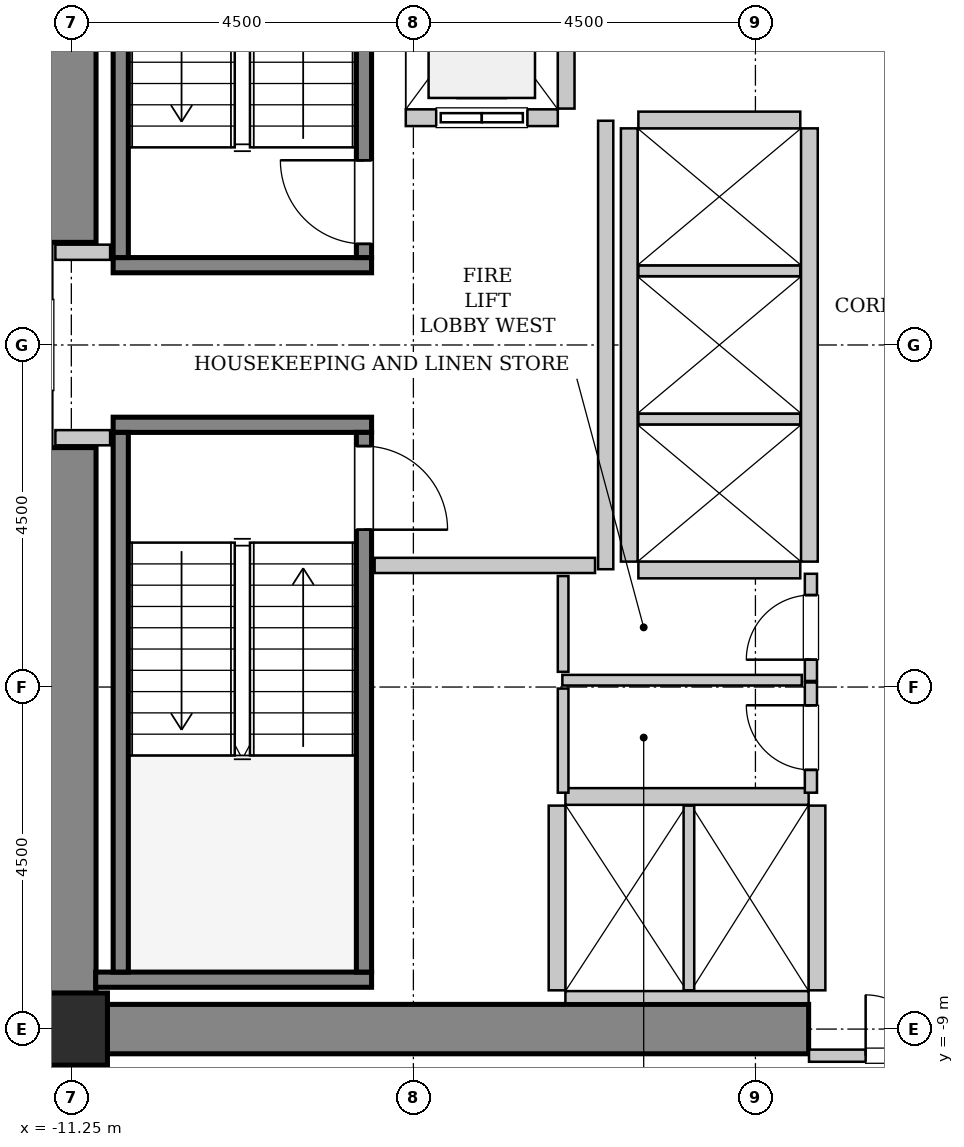
"""IFC4 building model, lengths in metres.
Left out: names, types, materials, properties, quantities, classifications, styles, units other than length and angle.
Written with IfcOpenShell. Run it as: python <this file> out.ifc"""

import sys

from ifc_helpers import new_model, si_unit, direction, frame, frame_2d, origin, origin_2d, place, context, subcontext, project, spatial, rectangle, hollow_rectangle, extrude, source, transform, mapped, element, fill, save


model = new_model("IFC4")
c1 = context("Model", 3, precision=1e-05, world=origin(), true_north=direction((0.0, 1.0)))
c2 = subcontext(c1, "Body", "Model", "MODEL_VIEW")
j1 = project(units=[si_unit("LENGTHUNIT", "METRE"), si_unit("PLANEANGLEUNIT", "RADIAN")], contexts=[c1])
p1 = place(None, origin())
s1 = spatial("IfcSite", under=j1, at=p1, CompositionType="ELEMENT")
p2 = place(p1, origin())
s2 = spatial("IfcBuilding", under=s1, at=p2, CompositionType="ELEMENT")
p3 = place(p2, frame((0.0, 0.0, 55.8)))
s3 = spatial("IfcBuildingStorey", under=s2, at=p3, CompositionType="ELEMENT", Elevation=55.8)
m1 = source(origin(), c2, "Body", "SweptSolid", [
    extrude(rectangle(XDim=10.025, YDim=0.65, at=frame_2d((5.012, 0.0))), origin(), (0.0, 0.0, 1.0), 3.8),
])
p4 = place(p3, frame((-11.575, -9.0, 0.0), z_axis=(0.0, 0.0, 1.0), x_axis=(1.0, 0.0, 0.0)))
e1 = element("IfcWall", 1, at=p4, inside=s3, PredefinedType="SHEAR", context=c2, shape_type="MappedRepresentation", body=[
    mapped(m1, transform((0.0, 0.0, 0.0), x_axis=(1.0, 0.0, 0.0), y_axis=(0.0, 1.0, 0.0), z_axis=(0.0, 0.0, 1.0), scale=1.0)),
])
m2 = source(origin(), c2, "Body", "SweptSolid", [
    extrude(rectangle(XDim=7.325, YDim=0.65, at=frame_2d((3.663, 0.0))), origin(), (0.0, 0.0, 1.0), 3.8),
])
for number, where, z_axis, x_axis in (
    (2, (-11.25, -8.675, 0.0), (0.0, 0.0, 1.0), (0.0, 1.0, 0.0)),
    (3, (-11.25, 1.35, 0.0), (0.0, 0.0, 1.0), (0.0, 1.0, 0.0)),
):
    element("IfcWall", number, at=place(p3, frame(where, z_axis=z_axis, x_axis=x_axis)), inside=s3, PredefinedType="SHEAR", context=c2, shape_type="MappedRepresentation", body=[
        mapped(m2, transform((0.0, 0.0, 0.0), x_axis=(1.0, 0.0, 0.0), y_axis=(0.0, 1.0, 0.0), z_axis=(0.0, 0.0, 1.0), scale=1.0)),
    ])
m3 = source(origin(), c2, "Body", "SweptSolid", [
    extrude(hollow_rectangle(XDim=0.95, YDim=0.95, WallThickness=0.045, InnerFilletRadius=0.045, OuterFilletRadius=0.09, at=origin_2d()), origin(), (0.0, 0.0, 1.0), 3.8),
])
p5 = place(p3, frame((-11.25, -9.0, 0.0), z_axis=(0.0, 0.0, 1.0), x_axis=(1.0, 0.0, 0.0)))
e4 = element("IfcColumn", 4, at=p5, inside=s3, PredefinedType="COLUMN", context=c2, shape_type="MappedRepresentation", body=[
    mapped(m3, transform((0.0, 0.0, 0.0), x_axis=(1.0, 0.0, 0.0), y_axis=(0.0, 1.0, 0.0), z_axis=(0.0, 0.0, 1.0), scale=1.0)),
])
m4 = source(origin(), c2, "Body", "SweptSolid", [
    extrude(rectangle(XDim=3.4, YDim=0.2, at=frame_2d((1.7, 0.0))), origin(), (0.0, 0.0, 1.0), 3.8),
])
p6 = place(p3, frame((-7.3, 1.05, 0.0), z_axis=(0.0, 0.0, 1.0), x_axis=(-1.0, 0.0, 0.0)))
e5 = element("IfcWall", 5, at=p6, inside=s3, PredefinedType="SOLIDWALL", context=c2, shape_type="MappedRepresentation", body=[
    mapped(m4, transform((0.0, 0.0, 0.0), x_axis=(1.0, 0.0, 0.0), y_axis=(0.0, 1.0, 0.0), z_axis=(0.0, 0.0, 1.0), scale=1.0)),
])
m5 = source(origin(), c2, "Body", "SweptSolid", [
    extrude(rectangle(XDim=7.1, YDim=0.2, at=frame_2d((3.55, 0.0))), origin(), (0.0, 0.0, 1.0), 3.8),
])
p7 = place(p3, frame((-7.4, 1.15, 0.0), z_axis=(0.0, 0.0, 1.0), x_axis=(0.0, 1.0, 0.0)))
e6 = element("IfcWall", 6, at=p7, inside=s3, PredefinedType="SOLIDWALL", context=c2, shape_type="MappedRepresentation", body=[
    mapped(m5, transform((0.0, 0.0, 0.0), x_axis=(1.0, 0.0, 0.0), y_axis=(0.0, 1.0, 0.0), z_axis=(0.0, 0.0, 1.0), scale=1.0)),
])
p8 = place(p7, frame((0.18, 0.0, 0.0)))
e7 = element("IfcOpeningElement", 7, at=p8, cuts=e6, PredefinedType="OPENING", context=c2, shape_type="SweptSolid", body=[
    extrude(rectangle(XDim=1.1, YDim=2.15, at=frame_2d((0.55, 1.075))), frame((0.0, 0.11, 0.0), z_axis=(0.0, -1.0, 0.0), x_axis=(1.0, 0.0, 0.0)), (0.0, 0.0, 1.0), 0.22),
])
p9 = place(p3, frame((-10.6, 1.15, 0.0), z_axis=(0.0, 0.0, 1.0), x_axis=(0.0, 1.0, 0.0)))
e8 = element("IfcWall", 8, at=p9, inside=s3, PredefinedType="SOLIDWALL", context=c2, shape_type="MappedRepresentation", body=[
    mapped(m5, transform((0.0, 0.0, 0.0), x_axis=(1.0, 0.0, 0.0), y_axis=(0.0, 1.0, 0.0), z_axis=(0.0, 0.0, 1.0), scale=1.0)),
])
p10 = place(p3, frame((-10.7, -1.05, 0.0), z_axis=(0.0, 0.0, 1.0), x_axis=(1.0, 0.0, 0.0)))
e9 = element("IfcWall", 9, at=p10, inside=s3, PredefinedType="SOLIDWALL", context=c2, shape_type="MappedRepresentation", body=[
    mapped(m4, transform((0.0, 0.0, 0.0), x_axis=(1.0, 0.0, 0.0), y_axis=(0.0, 1.0, 0.0), z_axis=(0.0, 0.0, 1.0), scale=1.0)),
])
m6 = source(origin(), c2, "Body", "SweptSolid", [
    extrude(rectangle(XDim=3.63, YDim=0.2, at=frame_2d((1.815, 0.0))), origin(), (0.0, 0.0, 1.0), 3.8),
])
p11 = place(p3, frame((-10.93, -8.35, 0.0), z_axis=(0.0, 0.0, 1.0), x_axis=(1.0, 0.0, 0.0)))
e10 = element("IfcWall", 10, at=p11, inside=s3, PredefinedType="SOLIDWALL", context=c2, shape_type="MappedRepresentation", body=[
    mapped(m6, transform((0.0, 0.0, 0.0), x_axis=(1.0, 0.0, 0.0), y_axis=(0.0, 1.0, 0.0), z_axis=(0.0, 0.0, 1.0), scale=1.0)),
])
p12 = place(p3, frame((-10.6, -1.15, 0.0), z_axis=(0.0, 0.0, 1.0), x_axis=(0.0, -1.0, 0.0)))
e11 = element("IfcWall", 11, at=p12, inside=s3, PredefinedType="SOLIDWALL", context=c2, shape_type="MappedRepresentation", body=[
    mapped(m5, transform((0.0, 0.0, 0.0), x_axis=(1.0, 0.0, 0.0), y_axis=(0.0, 1.0, 0.0), z_axis=(0.0, 0.0, 1.0), scale=1.0)),
])
p13 = place(p3, frame((-7.4, -1.15, 0.0), z_axis=(0.0, 0.0, 1.0), x_axis=(0.0, -1.0, 0.0)))
e12 = element("IfcWall", 12, at=p13, inside=s3, PredefinedType="SOLIDWALL", context=c2, shape_type="MappedRepresentation", body=[
    mapped(m5, transform((0.0, 0.0, 0.0), x_axis=(1.0, 0.0, 0.0), y_axis=(0.0, 1.0, 0.0), z_axis=(0.0, 0.0, 1.0), scale=1.0)),
])
p14 = place(p13, frame((0.18, 0.0, 0.0)))
e13 = element("IfcOpeningElement", 13, at=p14, cuts=e12, PredefinedType="OPENING", context=c2, shape_type="SweptSolid", body=[
    extrude(rectangle(XDim=1.1, YDim=2.15, at=frame_2d((0.55, 1.075))), frame((0.0, 0.11, 0.0), z_axis=(0.0, -1.0, 0.0), x_axis=(1.0, 0.0, 0.0)), (0.0, 0.0, 1.0), 0.22),
])
m7 = source(origin(), c2, "Body", "SweptSolid", [
    extrude(rectangle(XDim=2.0, YDim=0.22, at=frame_2d((1.0, 0.0))), origin(), (0.0, 0.0, 1.0), 3.535),
])
p15 = place(p3, frame((-6.85, 2.99, 0.0), z_axis=(0.0, 0.0, 1.0), x_axis=(1.0, 0.0, 0.0)))
e14 = element("IfcWall", 14, at=p15, inside=s3, PredefinedType="SOLIDWALL", context=c2, shape_type="MappedRepresentation", body=[
    mapped(m7, transform((0.0, 0.0, 0.0), x_axis=(1.0, 0.0, 0.0), y_axis=(0.0, 1.0, 0.0), z_axis=(0.0, 0.0, 1.0), scale=1.0)),
])
p16 = place(p15, frame((0.4, 0.0, 0.0)))
e15 = element("IfcOpeningElement", 15, at=p16, cuts=e14, PredefinedType="OPENING", context=c2, shape_type="SweptSolid", body=[
    extrude(rectangle(XDim=1.2, YDim=2.2, at=frame_2d((0.6, 1.1))), frame((0.0, 0.12, 0.0), z_axis=(0.0, -1.0, 0.0), x_axis=(1.0, 0.0, 0.0)), (0.0, 0.0, 1.0), 0.24),
])
m8 = source(origin(), c2, "Body", "SweptSolid", [
    extrude(rectangle(XDim=2.68, YDim=0.22, at=frame_2d((1.34, 0.0))), origin(), (0.0, 0.0, 1.0), 3.535),
])
p17 = place(p3, frame((-4.74, 3.11, 0.0), z_axis=(0.0, 0.0, 1.0), x_axis=(0.0, 1.0, 0.0)))
e16 = element("IfcWall", 16, at=p17, inside=s3, PredefinedType="SOLIDWALL", context=c2, shape_type="MappedRepresentation", body=[
    mapped(m8, transform((0.0, 0.0, 0.0), x_axis=(1.0, 0.0, 0.0), y_axis=(0.0, 1.0, 0.0), z_axis=(0.0, 0.0, 1.0), scale=1.0)),
])
m9 = source(origin(), c2, "Body", "SweptSolid", [
    extrude(rectangle(XDim=3.2, YDim=0.22, at=frame_2d((1.6, 0.0))), origin(), (0.0, 0.0, 1.0), 3.535),
])
p18 = place(p3, frame((-1.55, -5.94, 0.0), z_axis=(0.0, 0.0, 1.0), x_axis=(-1.0, 0.0, 0.0)))
e17 = element("IfcWall", 17, at=p18, inside=s3, PredefinedType="SOLIDWALL", context=c2, shape_type="MappedRepresentation", body=[
    mapped(m9, transform((0.0, 0.0, 0.0), x_axis=(1.0, 0.0, 0.0), y_axis=(0.0, 1.0, 0.0), z_axis=(0.0, 0.0, 1.0), scale=1.0)),
])
m10 = source(origin(), c2, "Body", "SweptSolid", [
    extrude(rectangle(XDim=3.2, YDim=0.16, at=frame_2d((1.6, 0.0))), origin(), (0.0, 0.0, 1.0), 2.425),
])
p19 = place(p3, frame((-4.75, -8.58, 0.0), z_axis=(0.0, 0.0, 1.0), x_axis=(1.0, 0.0, 0.0)))
e18 = element("IfcWall", 18, at=p19, inside=s3, PredefinedType="PARTITIONING", context=c2, shape_type="MappedRepresentation", body=[
    mapped(m10, transform((0.0, 0.0, 0.0), x_axis=(1.0, 0.0, 0.0), y_axis=(0.0, 1.0, 0.0), z_axis=(0.0, 0.0, 1.0), scale=1.0)),
])
m11 = source(origin(), c2, "Body", "SweptSolid", [
    extrude(rectangle(XDim=2.43, YDim=0.22, at=frame_2d((1.215, 0.0))), origin(), (0.0, 0.0, 1.0), 3.535),
])
p20 = place(p3, frame((-4.86, -6.06, 0.0), z_axis=(0.0, 0.0, 1.0), x_axis=(0.0, -1.0, 0.0)))
e19 = element("IfcWall", 19, at=p20, inside=s3, PredefinedType="SOLIDWALL", context=c2, shape_type="MappedRepresentation", body=[
    mapped(m11, transform((0.0, 0.0, 0.0), x_axis=(1.0, 0.0, 0.0), y_axis=(0.0, 1.0, 0.0), z_axis=(0.0, 0.0, 1.0), scale=1.0)),
])
m12 = source(origin(), c2, "Body", "SweptSolid", [
    extrude(rectangle(XDim=2.43, YDim=0.14, at=frame_2d((1.215, 0.0))), origin(), (0.0, 0.0, 1.0), 3.535),
])
p21 = place(p3, frame((-3.125, -8.49, 0.0), z_axis=(0.0, 0.0, 1.0), x_axis=(0.0, 1.0, 0.0)))
e20 = element("IfcWall", 20, at=p21, inside=s3, PredefinedType="PARTITIONING", context=c2, shape_type="MappedRepresentation", body=[
    mapped(m12, transform((0.0, 0.0, 0.0), x_axis=(1.0, 0.0, 0.0), y_axis=(0.0, 1.0, 0.0), z_axis=(0.0, 0.0, 1.0), scale=1.0)),
])
p22 = place(p3, frame((-1.44, -8.49, 0.0), z_axis=(0.0, 0.0, 1.0), x_axis=(0.0, 1.0, 0.0)))
e21 = element("IfcWall", 21, at=p22, inside=s3, PredefinedType="SOLIDWALL", context=c2, shape_type="MappedRepresentation", body=[
    mapped(m11, transform((0.0, 0.0, 0.0), x_axis=(1.0, 0.0, 0.0), y_axis=(0.0, 1.0, 0.0), z_axis=(0.0, 0.0, 1.0), scale=1.0)),
])
m13 = source(origin(), c2, "Body", "SweptSolid", [
    extrude(rectangle(XDim=5.7, YDim=0.22, at=frame_2d((2.85, 0.0))), origin(), (0.0, 0.0, 1.0), 3.535),
])
for number, where, z_axis, x_axis in (
    (22, (-1.54, -2.85, 0.0), (0.0, 0.0, 1.0), (0.0, 1.0, 0.0)),
    (23, (-3.91, 2.85, 0.0), (0.0, 0.0, 1.0), (0.0, -1.0, 0.0)),
):
    element("IfcWall", number, at=place(p3, frame(where, z_axis=z_axis, x_axis=x_axis)), inside=s3, PredefinedType="SOLIDWALL", context=c2, shape_type="MappedRepresentation", body=[
        mapped(m13, transform((0.0, 0.0, 0.0), x_axis=(1.0, 0.0, 0.0), y_axis=(0.0, 1.0, 0.0), z_axis=(0.0, 0.0, 1.0), scale=1.0)),
    ])
m14 = source(origin(), c2, "Body", "SweptSolid", [
    extrude(rectangle(XDim=2.13, YDim=0.22, at=frame_2d((1.065, 0.0))), origin(), (0.0, 0.0, 1.0), 3.535),
])
p23 = place(p3, frame((-3.79, -2.96, 0.0), z_axis=(0.0, 0.0, 1.0), x_axis=(1.0, 0.0, 0.0)))
e24 = element("IfcWall", 24, at=p23, inside=s3, PredefinedType="SOLIDWALL", context=c2, shape_type="MappedRepresentation", body=[
    mapped(m14, transform((0.0, 0.0, 0.0), x_axis=(1.0, 0.0, 0.0), y_axis=(0.0, 1.0, 0.0), z_axis=(0.0, 0.0, 1.0), scale=1.0)),
])
m15 = source(origin(), c2, "Body", "SweptSolid", [
    extrude(rectangle(XDim=2.13, YDim=0.14, at=frame_2d((1.065, 0.0))), origin(), (0.0, 0.0, 1.0), 3.535),
])
for number, where, z_axis, x_axis in (
    (25, (-3.79, -0.975, 0.0), (0.0, 0.0, 1.0), (1.0, 0.0, 0.0)),
    (26, (-3.79, 0.975, 0.0), (0.0, 0.0, 1.0), (1.0, 0.0, 0.0)),
):
    element("IfcWall", number, at=place(p3, frame(where, z_axis=z_axis, x_axis=x_axis)), inside=s3, PredefinedType="PARTITIONING", context=c2, shape_type="MappedRepresentation", body=[
        mapped(m15, transform((0.0, 0.0, 0.0), x_axis=(1.0, 0.0, 0.0), y_axis=(0.0, 1.0, 0.0), z_axis=(0.0, 0.0, 1.0), scale=1.0)),
    ])
p24 = place(p3, frame((-1.66, 2.96, 0.0), z_axis=(0.0, 0.0, 1.0), x_axis=(-1.0, 0.0, 0.0)))
e27 = element("IfcWall", 27, at=p24, inside=s3, PredefinedType="SOLIDWALL", context=c2, shape_type="MappedRepresentation", body=[
    mapped(m14, transform((0.0, 0.0, 0.0), x_axis=(1.0, 0.0, 0.0), y_axis=(0.0, 1.0, 0.0), z_axis=(0.0, 0.0, 1.0), scale=1.0)),
])
m16 = source(origin(), c2, "Body", "SweptSolid", [
    extrude(rectangle(XDim=5.9, YDim=0.2, at=frame_2d((2.95, 0.0))), origin(), (0.0, 0.0, 1.0), 3.535),
])
p25 = place(p3, frame((-4.22, -2.95, 0.0), z_axis=(0.0, 0.0, 1.0), x_axis=(0.0, 1.0, 0.0)))
e28 = element("IfcWall", 28, at=p25, inside=s3, PredefinedType="PARTITIONING", context=c2, shape_type="MappedRepresentation", body=[
    mapped(m16, transform((0.0, 0.0, 0.0), x_axis=(1.0, 0.0, 0.0), y_axis=(0.0, 1.0, 0.0), z_axis=(0.0, 0.0, 1.0), scale=1.0)),
])
m17 = source(origin(), c2, "Body", "SweptSolid", [
    extrude(rectangle(XDim=2.9, YDim=0.2, at=frame_2d((1.45, 0.0))), origin(), (0.0, 0.0, 1.0), 3.535),
])
p26 = place(p3, frame((-7.26, -2.9, 0.0), z_axis=(0.0, 0.0, 1.0), x_axis=(1.0, 0.0, 0.0)))
e29 = element("IfcWall", 29, at=p26, inside=s3, PredefinedType="PARTITIONING", context=c2, shape_type="MappedRepresentation", body=[
    mapped(m17, transform((0.0, 0.0, 0.0), x_axis=(1.0, 0.0, 0.0), y_axis=(0.0, 1.0, 0.0), z_axis=(0.0, 0.0, 1.0), scale=1.0)),
])
m18 = source(origin(), c2, "Body", "SweptSolid", [
    extrude(rectangle(XDim=0.72, YDim=0.2, at=frame_2d((0.36, 0.0))), origin(), (0.0, 0.0, 1.0), 3.535),
])
for number, where, z_axis, x_axis in (
    (30, (-11.46, 1.22, 0.0), (0.0, 0.0, 1.0), (1.0, 0.0, 0.0)),
    (31, (-11.46, -1.22, 0.0), (0.0, 0.0, 1.0), (1.0, 0.0, 0.0)),
):
    element("IfcWall", number, at=place(p3, frame(where, z_axis=z_axis, x_axis=x_axis)), inside=s3, PredefinedType="PARTITIONING", context=c2, shape_type="MappedRepresentation", body=[
        mapped(m18, transform((0.0, 0.0, 0.0), x_axis=(1.0, 0.0, 0.0), y_axis=(0.0, 1.0, 0.0), z_axis=(0.0, 0.0, 1.0), scale=1.0)),
    ])
m19 = source(origin(), c2, "Body", "SweptSolid", [
    extrude(rectangle(XDim=3.09, YDim=0.16, at=frame_2d((1.545, 0.0))), origin(), (0.0, 0.0, 1.0), 2.425),
])
p27 = place(p3, frame((-1.545, -9.35, 0.0), z_axis=(0.0, 0.0, 1.0), x_axis=(1.0, 0.0, 0.0)))
e32 = element("IfcWall", 32, at=p27, inside=s3, PredefinedType="PARTITIONING", context=c2, shape_type="MappedRepresentation", body=[
    mapped(m19, transform((0.0, 0.0, 0.0), x_axis=(1.0, 0.0, 0.0), y_axis=(0.0, 1.0, 0.0), z_axis=(0.0, 0.0, 1.0), scale=1.0)),
])
p28 = place(p27, frame((0.745, 0.0, 0.0)))
e33 = element("IfcOpeningElement", 33, at=p28, cuts=e32, PredefinedType="OPENING", context=c2, shape_type="SweptSolid", body=[
    extrude(rectangle(XDim=1.6, YDim=2.3, at=frame_2d((0.8, 1.15))), frame((0.0, 0.09, 0.0), z_axis=(0.0, -1.0, 0.0), x_axis=(1.0, 0.0, 0.0)), (0.0, 0.0, 1.0), 0.18),
])
m20 = source(origin(), c2, "Body", "SweptSolid", [
    extrude(rectangle(XDim=1.41, YDim=0.16, at=frame_2d((0.705, 0.0))), origin(), (0.0, 0.0, 1.0), 3.535),
])
p29 = place(p3, frame((-1.52, -4.42, 0.0), z_axis=(0.0, 0.0, 1.0), x_axis=(0.0, 1.0, 0.0)))
e34 = element("IfcWall", 34, at=p29, inside=s3, PredefinedType="PARTITIONING", context=c2, shape_type="MappedRepresentation", body=[
    mapped(m20, transform((0.0, 0.0, 0.0), x_axis=(1.0, 0.0, 0.0), y_axis=(0.0, 1.0, 0.0), z_axis=(0.0, 0.0, 1.0), scale=1.0)),
])
p30 = place(p29, frame((0.28, 0.0, 0.0)))
e35 = element("IfcOpeningElement", 35, at=p30, cuts=e34, PredefinedType="OPENING", context=c2, shape_type="SweptSolid", body=[
    extrude(rectangle(XDim=0.85, YDim=2.1, at=frame_2d((0.425, 1.05))), frame((0.0, 0.09, 0.0), z_axis=(0.0, -1.0, 0.0), x_axis=(1.0, 0.0, 0.0)), (0.0, 0.0, 1.0), 0.18),
])
m21 = source(origin(), c2, "Body", "SweptSolid", [
    extrude(rectangle(XDim=3.15, YDim=0.14, at=frame_2d((1.575, 0.0))), origin(), (0.0, 0.0, 1.0), 3.535),
])
p31 = place(p3, frame((-4.79, -4.41, 0.0), z_axis=(0.0, 0.0, 1.0), x_axis=(1.0, 0.0, 0.0)))
e36 = element("IfcWall", 36, at=p31, inside=s3, PredefinedType="PARTITIONING", context=c2, shape_type="MappedRepresentation", body=[
    mapped(m21, transform((0.0, 0.0, 0.0), x_axis=(1.0, 0.0, 0.0), y_axis=(0.0, 1.0, 0.0), z_axis=(0.0, 0.0, 1.0), scale=1.0)),
])
m22 = source(origin(), c2, "Body", "SweptSolid", [
    extrude(rectangle(XDim=1.26, YDim=0.14, at=frame_2d((0.63, 0.0))), origin(), (0.0, 0.0, 1.0), 3.535),
])
p32 = place(p3, frame((-4.78, -4.3, 0.0), z_axis=(0.0, 0.0, 1.0), x_axis=(0.0, 1.0, 0.0)))
e37 = element("IfcWall", 37, at=p32, inside=s3, PredefinedType="PARTITIONING", context=c2, shape_type="MappedRepresentation", body=[
    mapped(m22, transform((0.0, 0.0, 0.0), x_axis=(1.0, 0.0, 0.0), y_axis=(0.0, 1.0, 0.0), z_axis=(0.0, 0.0, 1.0), scale=1.0)),
])
m23 = source(origin(), c2, "Body", "SweptSolid", [
    extrude(rectangle(XDim=1.45, YDim=0.16, at=frame_2d((0.725, 0.0))), origin(), (0.0, 0.0, 1.0), 3.535),
])
p33 = place(p3, frame((-1.52, -5.89, 0.0), z_axis=(0.0, 0.0, 1.0), x_axis=(0.0, 1.0, 0.0)))
e38 = element("IfcWall", 38, at=p33, inside=s3, PredefinedType="PARTITIONING", context=c2, shape_type="MappedRepresentation", body=[
    mapped(m23, transform((0.0, 0.0, 0.0), x_axis=(1.0, 0.0, 0.0), y_axis=(0.0, 1.0, 0.0), z_axis=(0.0, 0.0, 1.0), scale=1.0)),
])
p34 = place(p33, frame((0.3, 0.0, 0.0)))
e39 = element("IfcOpeningElement", 39, at=p34, cuts=e38, PredefinedType="OPENING", context=c2, shape_type="SweptSolid", body=[
    extrude(rectangle(XDim=0.85, YDim=2.1, at=frame_2d((0.425, 1.05))), frame((0.0, 0.09, 0.0), z_axis=(0.0, -1.0, 0.0), x_axis=(1.0, 0.0, 0.0)), (0.0, 0.0, 1.0), 0.18),
])
m24 = source(origin(), c2, "Body", "SweptSolid", [
    extrude(rectangle(XDim=1.37, YDim=0.14, at=frame_2d((0.685, 0.0))), origin(), (0.0, 0.0, 1.0), 3.535),
])
p35 = place(p3, frame((-4.78, -5.89, 0.0), z_axis=(0.0, 0.0, 1.0), x_axis=(0.0, 1.0, 0.0)))
e40 = element("IfcWall", 40, at=p35, inside=s3, PredefinedType="PARTITIONING", context=c2, shape_type="MappedRepresentation", body=[
    mapped(m24, transform((0.0, 0.0, 0.0), x_axis=(1.0, 0.0, 0.0), y_axis=(0.0, 1.0, 0.0), z_axis=(0.0, 0.0, 1.0), scale=1.0)),
])
m25 = source(origin(), c2, "Body", "SweptSolid", [
    extrude(rectangle(XDim=1.1, YDim=2.15, at=frame_2d((0.55, 1.075))), frame((0.0, 0.025, 0.0), z_axis=(0.0, -1.0, 0.0), x_axis=(1.0, 0.0, 0.0)), (0.0, 0.0, 1.0), 0.05),
])
p36 = place(p8, origin())
e41 = element("IfcDoor", 41, at=p36, inside=s3, OperationType="SINGLE_SWING_RIGHT", PredefinedType="DOOR", context=c2, shape_type="MappedRepresentation", body=[
    mapped(m25, transform((0.0, 0.0, 0.0), x_axis=(1.0, 0.0, 0.0), y_axis=(0.0, 1.0, 0.0), z_axis=(0.0, 0.0, 1.0), scale=1.0)),
])
fill(e7, e41)
p37 = place(p14, origin())
e42 = element("IfcDoor", 42, at=p37, inside=s3, OperationType="SINGLE_SWING_RIGHT", PredefinedType="DOOR", context=c2, shape_type="MappedRepresentation", body=[
    mapped(m25, transform((0.0, 0.0, 0.0), x_axis=(1.0, 0.0, 0.0), y_axis=(0.0, 1.0, 0.0), z_axis=(0.0, 0.0, 1.0), scale=1.0)),
])
fill(e13, e42)
m26 = source(origin(), c2, "Body", "SweptSolid", [
    extrude(rectangle(XDim=1.2, YDim=2.2, at=frame_2d((0.6, 1.1))), frame((0.0, 0.025, 0.0), z_axis=(0.0, -1.0, 0.0), x_axis=(1.0, 0.0, 0.0)), (0.0, 0.0, 1.0), 0.05),
])
p38 = place(p16, origin())
e43 = element("IfcDoor", 43, at=p38, inside=s3, OperationType="SLIDING_TO_LEFT", PredefinedType="DOOR", context=c2, shape_type="MappedRepresentation", body=[
    mapped(m26, transform((0.0, 0.0, 0.0), x_axis=(1.0, 0.0, 0.0), y_axis=(0.0, 1.0, 0.0), z_axis=(0.0, 0.0, 1.0), scale=1.0)),
])
fill(e15, e43)
m27 = source(origin(), c2, "Body", "SweptSolid", [
    extrude(rectangle(XDim=1.6, YDim=2.3, at=frame_2d((0.8, 1.15))), frame((0.0, 0.025, 0.0), z_axis=(0.0, -1.0, 0.0), x_axis=(1.0, 0.0, 0.0)), (0.0, 0.0, 1.0), 0.05),
])
p39 = place(p28, origin())
e44 = element("IfcDoor", 44, at=p39, inside=s3, OperationType="DOUBLE_DOOR_SINGLE_SWING", PredefinedType="DOOR", context=c2, shape_type="MappedRepresentation", body=[
    mapped(m27, transform((0.0, 0.0, 0.0), x_axis=(1.0, 0.0, 0.0), y_axis=(0.0, 1.0, 0.0), z_axis=(0.0, 0.0, 1.0), scale=1.0)),
])
fill(e33, e44)
m28 = source(origin(), c2, "Body", "SweptSolid", [
    extrude(rectangle(XDim=0.85, YDim=2.1, at=frame_2d((0.425, 1.05))), frame((0.0, 0.025, 0.0), z_axis=(0.0, -1.0, 0.0), x_axis=(1.0, 0.0, 0.0)), (0.0, 0.0, 1.0), 0.05),
])
p40 = place(p30, origin())
e45 = element("IfcDoor", 45, at=p40, inside=s3, OperationType="SINGLE_SWING_LEFT", PredefinedType="DOOR", context=c2, shape_type="MappedRepresentation", body=[
    mapped(m28, transform((0.0, 0.0, 0.0), x_axis=(1.0, 0.0, 0.0), y_axis=(0.0, 1.0, 0.0), z_axis=(0.0, 0.0, 1.0), scale=1.0)),
])
fill(e35, e45)
p41 = place(p34, origin())
e46 = element("IfcDoor", 46, at=p41, inside=s3, OperationType="SINGLE_SWING_RIGHT", PredefinedType="DOOR", context=c2, shape_type="MappedRepresentation", body=[
    mapped(m28, transform((0.0, 0.0, 0.0), x_axis=(1.0, 0.0, 0.0), y_axis=(0.0, 1.0, 0.0), z_axis=(0.0, 0.0, 1.0), scale=1.0)),
])
fill(e39, e46)
save(model, sys.argv[1])
